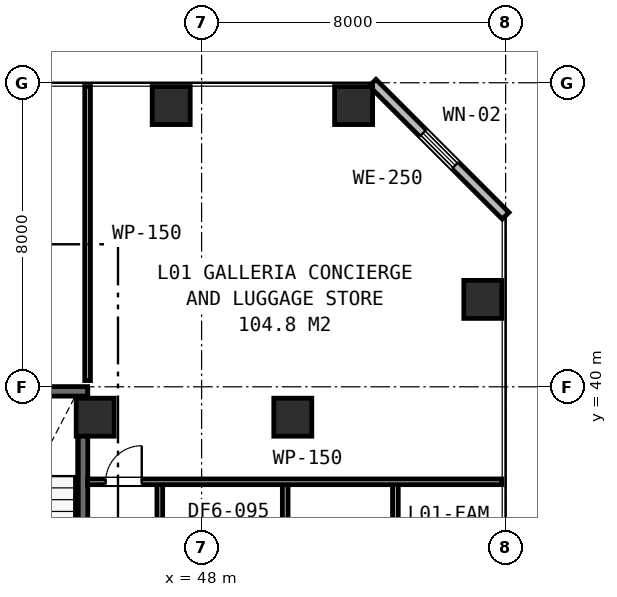
"""IFC4 building model, lengths in metres.
Left out: names, types, materials, properties, quantities, classifications, styles, units other than length and angle.
Written with IfcOpenShell. Run it as: python <this file> out.ifc"""

import sys

from ifc_helpers import new_model, si_unit, direction, frame, frame_2d, origin, origin_2d, place, context, subcontext, project, spatial, rectangle, extrude, element, fill, save


model = new_model("IFC4")
c1 = context("Model", 3, precision=1e-05, world=origin(), true_north=direction((0.0, 1.0)))
c2 = subcontext(c1, "Body", "Model", "MODEL_VIEW")
j1 = project(units=[si_unit("LENGTHUNIT", "METRE"), si_unit("PLANEANGLEUNIT", "RADIAN")], contexts=[c1])
p1 = place(None, origin())
s1 = spatial("IfcSite", under=j1, at=p1, CompositionType="ELEMENT")
p2 = place(p1, origin())
s2 = spatial("IfcBuilding", under=s1, at=p2, CompositionType="ELEMENT")
p3 = place(p2, frame((0.0, 0.0, 6.0)))
s3 = spatial("IfcBuildingStorey", under=s2, at=p3, CompositionType="ELEMENT", Elevation=6.0)
p4 = place(p3, frame((44.88, 31.15, 0.0), z_axis=(0.0, 0.0, 1.0), x_axis=(0.0, 1.0, 0.0)))
e1 = element("IfcWall", 1, at=p4, inside=s3, PredefinedType="SHEAR", context=c2, shape_type="SweptSolid", body=[
    extrude(rectangle(XDim=8.8, YDim=0.25, at=frame_2d((4.4, 0.0))), origin(), (0.0, 0.0, 1.0), 5.1),
])
p5 = place(p3, frame((40.9, 39.88, 0.0), z_axis=(0.0, 0.0, 1.0), x_axis=(1.0, 0.0, 0.0)))
e2 = element("IfcWall", 2, at=p5, inside=s3, PredefinedType="SHEAR", context=c2, shape_type="SweptSolid", body=[
    extrude(rectangle(XDim=4.1, YDim=0.25, at=frame_2d((2.05, 0.0))), origin(), (0.0, 0.0, 1.0), 5.1),
])
for number, where, z_axis, x_axis in (
    (3, (45.2, 39.2, 0.0), (0.0, 0.0, 1.0), (1.0, 0.0, 0.0)),
    (4, (47.2, 47.4, 0.0), (0.0, 0.0, 1.0), (1.0, 0.0, 0.0)),
    (5, (50.4, 39.2, 0.0), (0.0, 0.0, 1.0), (1.0, 0.0, 0.0)),
    (6, (55.4, 42.3, 0.0), (0.0, 0.0, 1.0), (1.0, 0.0, 0.0)),
    (7, (52.0, 47.4, 0.0), (0.0, 0.0, 1.0), (1.0, 0.0, 0.0)),
):
    element("IfcColumn", number, at=place(p3, frame(where, z_axis=z_axis, x_axis=x_axis)), inside=s3, PredefinedType="COLUMN", context=c2, shape_type="SweptSolid", body=[
        extrude(rectangle(XDim=1.0, YDim=1.0, at=origin_2d()), origin(), (0.0, 0.0, 1.0), 5.1),
    ])
p6 = place(p3, frame((56.0, 44.5, 0.0), z_axis=(0.0, 0.0, 1.0), x_axis=(-0.707106781187, 0.707106781187, 0.0)))
e8 = element("IfcWall", 8, at=p6, inside=s3, PredefinedType="STANDARD", context=c2, shape_type="SweptSolid", body=[
    extrude(rectangle(XDim=4.95, YDim=0.25, at=frame_2d((2.475, 0.0))), origin(), (0.0, 0.0, 1.0), 4.77),
])
p7 = place(p6, frame((1.875, 0.0, 0.85)))
e9 = element("IfcOpeningElement", 9, at=p7, cuts=e8, PredefinedType="OPENING", context=c2, shape_type="SweptSolid", body=[
    extrude(rectangle(XDim=1.2, YDim=1.6, at=frame_2d((0.6, 0.8))), frame((0.0, 0.135, 0.0), z_axis=(0.0, -1.0, 0.0), x_axis=(1.0, 0.0, 0.0)), (0.0, 0.0, 1.0), 0.27),
])
for number, where, z_axis, x_axis in (
    (10, (46.9, 30.8, 0.0), (0.0, 0.0, 1.0), (0.0, 1.0, 0.0)),
    (11, (50.2, 30.8, 0.0), (0.0, 0.0, 1.0), (0.0, 1.0, 0.0)),
    (12, (53.1, 30.8, 0.0), (0.0, 0.0, 1.0), (0.0, 1.0, 0.0)),
):
    element("IfcWall", number, at=place(p3, frame(where, z_axis=z_axis, x_axis=x_axis)), inside=s3, PredefinedType="PARTITIONING", context=c2, shape_type="SweptSolid", body=[
        extrude(rectangle(XDim=6.7, YDim=0.15, at=frame_2d((3.35, 0.0))), origin(), (0.0, 0.0, 1.0), 4.12),
    ])
p8 = place(p3, frame((45.0, 37.5, 0.0), z_axis=(0.0, 0.0, 1.0), x_axis=(1.0, 0.0, 0.0)))
e13 = element("IfcWall", 13, at=p8, inside=s3, PredefinedType="PARTITIONING", context=c2, shape_type="SweptSolid", body=[
    extrude(rectangle(XDim=10.9, YDim=0.15, at=frame_2d((5.45, 0.0))), origin(), (0.0, 0.0, 1.0), 4.12),
])
p9 = place(p8, frame((0.475, 0.0, 0.0)))
e14 = element("IfcOpeningElement", 14, at=p9, cuts=e13, PredefinedType="OPENING", context=c2, shape_type="SweptSolid", body=[
    extrude(rectangle(XDim=0.95, YDim=2.15, at=frame_2d((0.475, 1.075))), frame((0.0, 0.085, 0.0), z_axis=(0.0, -1.0, 0.0), x_axis=(1.0, 0.0, 0.0)), (0.0, 0.0, 1.0), 0.17),
])
p10 = place(p3, frame((45.0, 40.163, 0.0), z_axis=(0.0, 0.0, 1.0), x_axis=(0.0, 1.0, 0.0)))
e15 = element("IfcWall", 15, at=p10, inside=s3, PredefinedType="PARTITIONING", context=c2, shape_type="SweptSolid", body=[
    extrude(rectangle(XDim=7.737, YDim=0.15, at=frame_2d((3.868, 0.0))), origin(), (0.0, 0.0, 1.0), 4.31),
])
p11 = place(p7, origin())
e16 = element("IfcWindow", 16, at=p11, inside=s3, PartitioningType="SINGLE_PANEL", PredefinedType="WINDOW", context=c2, shape_type="SweptSolid", body=[
    extrude(rectangle(XDim=1.2, YDim=1.6, at=frame_2d((0.6, 0.8))), frame((0.0, 0.03, 0.0), z_axis=(0.0, -1.0, 0.0), x_axis=(1.0, 0.0, 0.0)), (0.0, 0.0, 1.0), 0.06),
])
fill(e9, e16)
p12 = place(p9, origin())
e17 = element("IfcDoor", 17, at=p12, inside=s3, OperationType="SINGLE_SWING_RIGHT", PredefinedType="DOOR", context=c2, shape_type="SweptSolid", body=[
    extrude(rectangle(XDim=0.95, YDim=2.15, at=frame_2d((0.475, 1.075))), frame((0.0, 0.025, 0.0), z_axis=(0.0, -1.0, 0.0), x_axis=(1.0, 0.0, 0.0)), (0.0, 0.0, 1.0), 0.05),
])
fill(e14, e17)
save(model, sys.argv[1])
